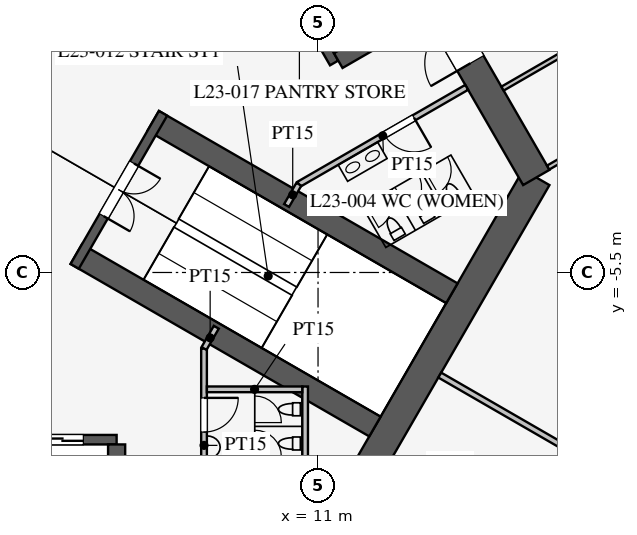
"""IFC4 building model, lengths in metres.
Left out: names, types, materials, properties, quantities, classifications, styles, units other than length and angle.
Written with IfcOpenShell. Run it as: python <this file> out.ifc"""

import sys

from ifc_helpers import new_model, si_unit, direction, frame, frame_2d, origin, place, context, subcontext, project, spatial, rectangle, extrude, element, fill, save


model = new_model("IFC4")
c1 = context("Model", 3, precision=1e-05, world=origin(), true_north=direction((0.0, 1.0)))
c2 = subcontext(c1, "Body", "Model", "MODEL_VIEW")
j1 = project(units=[si_unit("LENGTHUNIT", "METRE"), si_unit("PLANEANGLEUNIT", "RADIAN")], contexts=[c1])
p1 = place(None, origin())
s1 = spatial("IfcSite", under=j1, at=p1, CompositionType="ELEMENT")
p2 = place(p1, origin())
s2 = spatial("IfcBuilding", under=s1, at=p2, CompositionType="ELEMENT")
p3 = place(p2, frame((0.0, 0.0, 103.1)))
s3 = spatial("IfcBuildingStorey", under=s2, at=p3, CompositionType="ELEMENT", Elevation=103.1)
p4 = place(p3, frame((10.97, -13.0, 0.0), z_axis=(0.0, 0.0, 1.0), x_axis=(0.499995765644, 0.866027848477, 0.0)))
e1 = element("IfcWall", 1, at=p4, inside=s3, PredefinedType="SHEAR", context=c2, shape_type="SweptSolid", body=[
    extrude(rectangle(XDim=11.547, YDim=0.8, at=frame_2d((5.773, 0.0))), origin(), (0.0, 0.0, 1.0), 4.2),
])
p5 = place(p3, frame((16.743, -3.0, 0.0), z_axis=(0.0, 0.0, 1.0), x_axis=(-0.500002442456, 0.866023993627, 0.0)))
e2 = element("IfcWall", 2, at=p5, inside=s3, PredefinedType="SHEAR", context=c2, shape_type="SweptSolid", body=[
    extrude(rectangle(XDim=21.939, YDim=0.8, at=frame_2d((10.97, 0.0))), origin(), (0.0, 0.0, 1.0), 4.2),
])
p6 = place(p5, frame((17.27, 0.0, 0.0)))
e3 = element("IfcOpeningElement", 3, at=p6, cuts=e2, PredefinedType="OPENING", context=c2, shape_type="SweptSolid", body=[
    extrude(rectangle(XDim=1.2, YDim=2.1, at=frame_2d((0.6, 1.05))), frame((0.0, 0.41, 0.0), z_axis=(0.0, -1.0, 0.0), x_axis=(1.0, 0.0, 0.0)), (0.0, 0.0, 1.0), 0.82),
])
p7 = place(p5, frame((3.47, 0.0, 0.0)))
e4 = element("IfcOpeningElement", 4, at=p7, cuts=e2, PredefinedType="OPENING", context=c2, shape_type="SweptSolid", body=[
    extrude(rectangle(XDim=1.2, YDim=2.1, at=frame_2d((0.6, 1.05))), frame((0.0, 0.41, 0.0), z_axis=(0.0, -1.0, 0.0), x_axis=(1.0, 0.0, 0.0)), (0.0, 0.0, 1.0), 0.82),
])
p8 = place(p3, frame((-5.7, -9.9, 0.0), z_axis=(0.0, 0.0, 1.0), x_axis=(1.0, 0.0, 0.0)))
e5 = element("IfcWall", 5, at=p8, inside=s3, PredefinedType="SHEAR", context=c2, shape_type="SweptSolid", body=[
    extrude(rectangle(XDim=11.4, YDim=0.25, at=frame_2d((5.7, 0.0))), origin(), (0.0, 0.0, 1.0), 4.2),
])
p9 = place(p8, frame((0.875, 0.0, 0.0)))
e6 = element("IfcOpeningElement", 6, at=p9, cuts=e5, PredefinedType="OPENING", context=c2, shape_type="SweptSolid", body=[
    extrude(rectangle(XDim=1.1, YDim=2.2, at=frame_2d((0.55, 1.1))), frame((0.0, 0.135, 0.0), z_axis=(0.0, -1.0, 0.0), x_axis=(1.0, 0.0, 0.0)), (0.0, 0.0, 1.0), 0.27),
])
p10 = place(p8, frame((3.725, 0.0, 0.0)))
e7 = element("IfcOpeningElement", 7, at=p10, cuts=e5, PredefinedType="OPENING", context=c2, shape_type="SweptSolid", body=[
    extrude(rectangle(XDim=1.1, YDim=2.2, at=frame_2d((0.55, 1.1))), frame((0.0, 0.135, 0.0), z_axis=(0.0, -1.0, 0.0), x_axis=(1.0, 0.0, 0.0)), (0.0, 0.0, 1.0), 0.27),
])
p11 = place(p8, frame((6.575, 0.0, 0.0)))
e8 = element("IfcOpeningElement", 8, at=p11, cuts=e5, PredefinedType="OPENING", context=c2, shape_type="SweptSolid", body=[
    extrude(rectangle(XDim=1.1, YDim=2.2, at=frame_2d((0.55, 1.1))), frame((0.0, 0.135, 0.0), z_axis=(0.0, -1.0, 0.0), x_axis=(1.0, 0.0, 0.0)), (0.0, 0.0, 1.0), 0.27),
])
p12 = place(p8, frame((9.425, 0.0, 0.0)))
e9 = element("IfcOpeningElement", 9, at=p12, cuts=e5, PredefinedType="OPENING", context=c2, shape_type="SweptSolid", body=[
    extrude(rectangle(XDim=1.1, YDim=2.2, at=frame_2d((0.55, 1.1))), frame((0.0, 0.135, 0.0), z_axis=(0.0, -1.0, 0.0), x_axis=(1.0, 0.0, 0.0)), (0.0, 0.0, 1.0), 0.27),
])
p13 = place(p3, frame((5.7, -10.025, 0.0), z_axis=(0.0, 0.0, 1.0), x_axis=(0.0, -1.0, 0.0)))
e10 = element("IfcWall", 10, at=p13, inside=s3, PredefinedType="SHEAR", context=c2, shape_type="SweptSolid", body=[
    extrude(rectangle(XDim=2.575, YDim=0.45, at=frame_2d((1.288, 0.0))), origin(), (0.0, 0.0, 1.0), 4.2),
])
p14 = place(p3, frame((11.424, 0.014, 0.0), z_axis=(0.0, 0.0, 1.0), x_axis=(-0.500001763848, 0.866024385424, 0.0)))
e11 = element("IfcWall", 11, at=p14, inside=s3, PredefinedType="SHEAR", context=c2, shape_type="SweptSolid", body=[
    extrude(rectangle(XDim=11.4, YDim=0.25, at=frame_2d((5.7, 0.0))), origin(), (0.0, 0.0, 1.0), 4.2),
])
p15 = place(p14, frame((0.975, 0.0, 0.0)))
e12 = element("IfcOpeningElement", 12, at=p15, cuts=e11, PredefinedType="OPENING", context=c2, shape_type="SweptSolid", body=[
    extrude(rectangle(XDim=0.9, YDim=2.1, at=frame_2d((0.45, 1.05))), frame((0.0, 0.135, 0.0), z_axis=(0.0, -1.0, 0.0), x_axis=(1.0, 0.0, 0.0)), (0.0, 0.0, 1.0), 0.27),
])
p16 = place(p14, frame((3.825, 0.0, 0.0)))
e13 = element("IfcOpeningElement", 13, at=p16, cuts=e11, PredefinedType="OPENING", context=c2, shape_type="SweptSolid", body=[
    extrude(rectangle(XDim=0.9, YDim=2.1, at=frame_2d((0.45, 1.05))), frame((0.0, 0.135, 0.0), z_axis=(0.0, -1.0, 0.0), x_axis=(1.0, 0.0, 0.0)), (0.0, 0.0, 1.0), 0.27),
])
p17 = place(p3, frame((11.532, 0.076, 0.0), z_axis=(0.0, 0.0, 1.0), x_axis=(0.866005588531, 0.500034319456, 0.0)))
e14 = element("IfcWall", 14, at=p17, inside=s3, PredefinedType="SHEAR", context=c2, shape_type="SweptSolid", body=[
    extrude(rectangle(XDim=2.575, YDim=0.45, at=frame_2d((1.288, 0.0))), origin(), (0.0, 0.0, 1.0), 4.2),
])
for number, where, z_axis, x_axis in (
    (15, (4.638, -5.016, 0.0), (0.0, 0.0, 1.0), (0.866, -0.5, 0.0)),
    (16, (6.663, -1.509, 0.0), (0.0, 0.0, 1.0), (0.866, -0.5, 0.0)),
):
    element("IfcWall", number, at=place(p3, frame(where, z_axis=z_axis, x_axis=x_axis)), inside=s3, PredefinedType="SHEAR", context=c2, shape_type="SweptSolid", body=[
        extrude(rectangle(XDim=9.075, YDim=0.6, at=frame_2d((4.538, 0.0))), origin(), (0.0, 0.0, 1.0), 4.2),
    ])
p18 = place(p3, frame((4.597, -5.339, 0.0), z_axis=(0.0, 0.0, 1.0), x_axis=(0.499984536904, 0.866034331223, 0.0)))
e17 = element("IfcWall", 17, at=p18, inside=s3, PredefinedType="SHEAR", context=c2, shape_type="SweptSolid", body=[
    extrude(rectangle(XDim=4.65, YDim=0.25, at=frame_2d((2.325, 0.0))), origin(), (0.0, 0.0, 1.0), 4.2),
])
p19 = place(p18, frame((1.525, 0.0, 0.0)))
e18 = element("IfcOpeningElement", 18, at=p19, cuts=e17, PredefinedType="OPENING", context=c2, shape_type="SweptSolid", body=[
    extrude(rectangle(XDim=1.6, YDim=2.1, at=frame_2d((0.8, 1.05))), frame((0.0, 0.135, 0.0), z_axis=(0.0, -1.0, 0.0), x_axis=(1.0, 0.0, 0.0)), (0.0, 0.0, 1.0), 0.27),
])
p20 = place(p3, frame((8.0, -7.5, 0.0), z_axis=(0.0, 0.0, 1.0), x_axis=(0.0, -1.0, 0.0)))
e19 = element("IfcWall", 19, at=p20, inside=s3, PredefinedType="PARTITIONING", context=c2, shape_type="SweptSolid", body=[
    extrude(rectangle(XDim=5.1, YDim=0.15, at=frame_2d((2.55, 0.0))), origin(), (0.0, 0.0, 1.0), 4.0),
])
p21 = place(p20, frame((1.3, 0.0, 0.0)))
e20 = element("IfcOpeningElement", 20, at=p21, cuts=e19, PredefinedType="OPENING", context=c2, shape_type="SweptSolid", body=[
    extrude(rectangle(XDim=0.9, YDim=2.1, at=frame_2d((0.45, 1.05))), frame((0.0, 0.085, 0.0), z_axis=(0.0, -1.0, 0.0), x_axis=(1.0, 0.0, 0.0)), (0.0, 0.0, 1.0), 0.17),
])
p22 = place(p3, frame((10.495, -3.178, 0.0), z_axis=(0.0, 0.0, 1.0), x_axis=(0.86602216432, 0.500005610874, 0.0)))
e21 = element("IfcWall", 21, at=p22, inside=s3, PredefinedType="PARTITIONING", context=c2, shape_type="SweptSolid", body=[
    extrude(rectangle(XDim=5.1, YDim=0.15, at=frame_2d((2.55, 0.0))), origin(), (0.0, 0.0, 1.0), 4.0),
])
p23 = place(p22, frame((2.6, 0.0, 0.0)))
e22 = element("IfcOpeningElement", 22, at=p23, cuts=e21, PredefinedType="OPENING", context=c2, shape_type="SweptSolid", body=[
    extrude(rectangle(XDim=0.9, YDim=2.1, at=frame_2d((0.45, 1.05))), frame((0.0, 0.085, 0.0), z_axis=(0.0, -1.0, 0.0), x_axis=(1.0, 0.0, 0.0)), (0.0, 0.0, 1.0), 0.17),
])
for number, where, z_axis, x_axis in (
    (23, (8.0, -7.5, 0.0), (0.0, 0.0, 1.0), (0.5, 0.866, 0.0)),
    (24, (10.495, -3.178, 0.0), (0.0, 0.0, 1.0), (-0.5, -0.866, 0.0)),
):
    element("IfcWall", number, at=place(p3, frame(where, z_axis=z_axis, x_axis=x_axis)), inside=s3, PredefinedType="PARTITIONING", context=c2, shape_type="SweptSolid", body=[
        extrude(rectangle(XDim=0.645, YDim=0.15, at=frame_2d((0.323, 0.0))), origin(), (0.0, 0.0, 1.0), 4.0),
    ])
p24 = place(p3, frame((10.66, -8.5, 0.0), z_axis=(0.0, 0.0, 1.0), x_axis=(0.0, -1.0, 0.0)))
e25 = element("IfcWall", 25, at=p24, inside=s3, PredefinedType="PARTITIONING", context=c2, shape_type="SweptSolid", body=[
    extrude(rectangle(XDim=4.1, YDim=0.15, at=frame_2d((2.05, 0.0))), origin(), (0.0, 0.0, 1.0), 4.0),
])
p25 = place(p3, frame((8.075, -8.575, 0.0), z_axis=(0.0, 0.0, 1.0), x_axis=(1.0, 0.0, 0.0)))
e26 = element("IfcWall", 26, at=p25, inside=s3, PredefinedType="PARTITIONING", context=c2, shape_type="SweptSolid", body=[
    extrude(rectangle(XDim=2.51, YDim=0.15, at=frame_2d((1.255, 0.0))), origin(), (0.0, 0.0, 1.0), 4.0),
])
p26 = place(p3, frame((14.203, -8.2, 0.0), z_axis=(0.0, 0.0, 1.0), x_axis=(0.866024668836, -0.500001272966, 0.0)))
e27 = element("IfcWall", 27, at=p26, inside=s3, PredefinedType="PARTITIONING", context=c2, shape_type="SweptSolid", body=[
    extrude(rectangle(XDim=16.65, YDim=0.15, at=frame_2d((8.325, 0.0))), origin(), (0.0, 0.0, 1.0), 2.3),
])
for number, where, z_axis, x_axis in (
    (28, (17.055, -2.74, 0.0), (0.0, 0.0, 1.0), (0.866, 0.5, 0.0)),
    (29, (15.855, -0.661, 0.0), (0.0, 0.0, 1.0), (0.866, 0.5, 0.0)),
):
    element("IfcWall", number, at=place(p3, frame(where, z_axis=z_axis, x_axis=x_axis)), inside=s3, PredefinedType="PARTITIONING", context=c2, shape_type="SweptSolid", body=[
        extrude(rectangle(XDim=4.0, YDim=0.12, at=frame_2d((2.0, 0.0))), origin(), (0.0, 0.0, 1.0), 2.9),
    ])
p27 = place(p21, origin())
e30 = element("IfcDoor", 30, at=p27, inside=s3, OperationType="SINGLE_SWING_LEFT", PredefinedType="DOOR", context=c2, shape_type="SweptSolid", body=[
    extrude(rectangle(XDim=0.9, YDim=2.1, at=frame_2d((0.45, 1.05))), frame((0.0, 0.025, 0.0), z_axis=(0.0, -1.0, 0.0), x_axis=(1.0, 0.0, 0.0)), (0.0, 0.0, 1.0), 0.05),
])
fill(e20, e30)
p28 = place(p23, frame((0.9, 0.0, 0.0), z_axis=(0.0, 0.0, 1.0), x_axis=(-1.0, 0.0, 0.0)))
e31 = element("IfcDoor", 31, at=p28, inside=s3, OperationType="SINGLE_SWING_LEFT", PredefinedType="DOOR", context=c2, shape_type="SweptSolid", body=[
    extrude(rectangle(XDim=0.9, YDim=2.1, at=frame_2d((0.45, 1.05))), frame((0.0, 0.025, 0.0), z_axis=(0.0, -1.0, 0.0), x_axis=(1.0, 0.0, 0.0)), (0.0, 0.0, 1.0), 0.05),
])
fill(e22, e31)
p29 = place(p19, frame((1.6, 0.0, 0.0), z_axis=(0.0, 0.0, 1.0), x_axis=(-1.0, 0.0, 0.0)))
e32 = element("IfcDoor", 32, at=p29, inside=s3, OperationType="DOUBLE_DOOR_SINGLE_SWING", PredefinedType="DOOR", context=c2, shape_type="SweptSolid", body=[
    extrude(rectangle(XDim=1.6, YDim=2.1, at=frame_2d((0.8, 1.05))), frame((0.0, 0.025, 0.0), z_axis=(0.0, -1.0, 0.0), x_axis=(1.0, 0.0, 0.0)), (0.0, 0.0, 1.0), 0.05),
])
fill(e18, e32)
p30 = place(p7, origin())
e33 = element("IfcDoor", 33, at=p30, inside=s3, OperationType="SINGLE_SWING_LEFT", PredefinedType="DOOR", context=c2, shape_type="SweptSolid", body=[
    extrude(rectangle(XDim=1.2, YDim=2.1, at=frame_2d((0.6, 1.05))), frame((0.0, 0.025, 0.0), z_axis=(0.0, -1.0, 0.0), x_axis=(1.0, 0.0, 0.0)), (0.0, 0.0, 1.0), 0.05),
])
fill(e4, e33)
p31 = place(p12, origin())
e34 = element("IfcDoor", 34, at=p31, inside=s3, OperationType="DOUBLE_DOOR_SLIDING", PredefinedType="DOOR", context=c2, shape_type="SweptSolid", body=[
    extrude(rectangle(XDim=1.1, YDim=2.2, at=frame_2d((0.55, 1.1))), frame((0.0, 0.025, 0.0), z_axis=(0.0, -1.0, 0.0), x_axis=(1.0, 0.0, 0.0)), (0.0, 0.0, 1.0), 0.05),
])
fill(e9, e34)
save(model, sys.argv[1])
